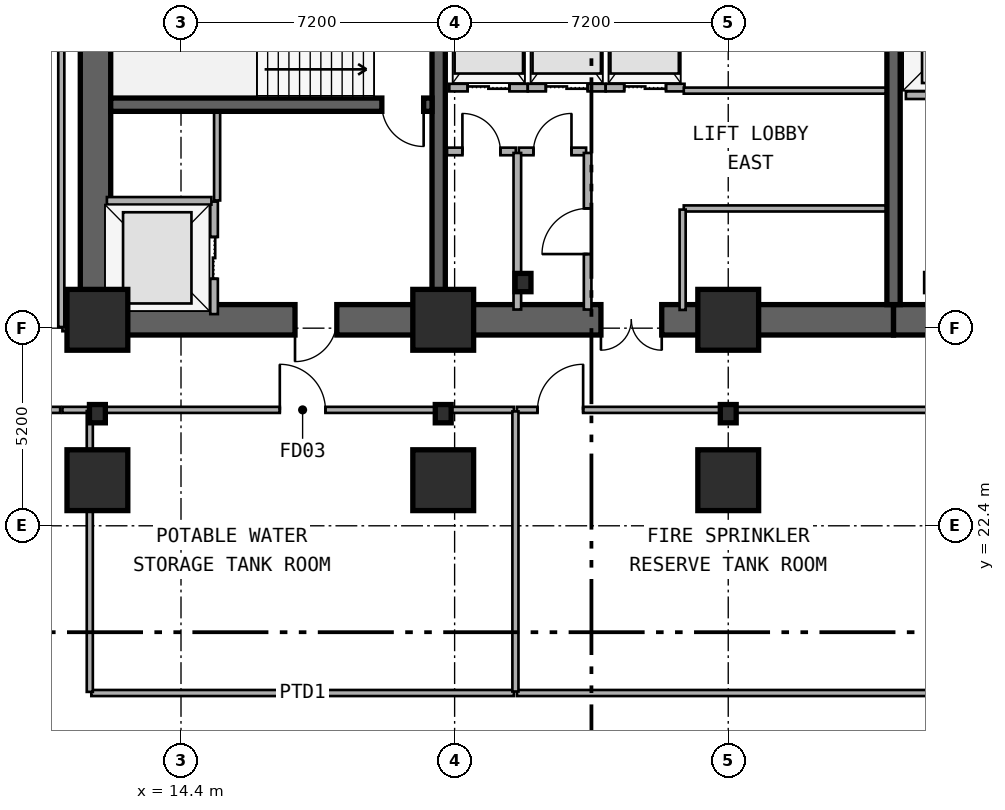
"""IFC4 building model, lengths in metres.
Left out: names, types, materials, properties, quantities, classifications, styles, units other than length and angle.
Written with IfcOpenShell. Run it as: python <this file> out.ifc"""

import sys

from ifc_helpers import new_model, si_unit, direction, frame, frame_2d, origin, origin_2d, place, context, subcontext, project, spatial, rectangle, i_section, extrude, element, fill, save


model = new_model("IFC4")
c1 = context("Model", 3, precision=1e-05, world=origin(), true_north=direction((0.0, 1.0)))
c2 = subcontext(c1, "Body", "Model", "MODEL_VIEW")
j1 = project(units=[si_unit("LENGTHUNIT", "METRE"), si_unit("PLANEANGLEUNIT", "RADIAN")], contexts=[c1])
p1 = place(None, origin())
s1 = spatial("IfcSite", under=j1, at=p1, CompositionType="ELEMENT")
p2 = place(p1, origin())
s2 = spatial("IfcBuilding", under=s1, at=p2, CompositionType="ELEMENT")
p3 = place(p2, frame((0.0, 0.0, -13.2)))
s3 = spatial("IfcBuildingStorey", under=s2, at=p3, CompositionType="ELEMENT", Elevation=-13.2)
p4 = place(p3, frame((21.18, 27.82, 0.0), z_axis=(0.0, 0.0, 1.0), x_axis=(-1.0, 0.0, 0.0)))
e1 = element("IfcWall", 1, at=p4, inside=s3, PredefinedType="SHEAR", context=c2, shape_type="SweptSolid", body=[
    extrude(rectangle(XDim=9.03, YDim=0.8, at=frame_2d((4.515, 0.0))), origin(), (0.0, 0.0, 1.0), 4.4),
])
p5 = place(p4, frame((2.68, 0.0, 0.0)))
e2 = element("IfcOpeningElement", 2, at=p5, cuts=e1, PredefinedType="OPENING", context=c2, shape_type="SweptSolid", body=[
    extrude(rectangle(XDim=1.1, YDim=2.15, at=frame_2d((0.55, 1.075))), frame((0.0, 0.41, 0.0), z_axis=(0.0, -1.0, 0.0), x_axis=(1.0, 0.0, 0.0)), (0.0, 0.0, 1.0), 0.82),
])
p6 = place(p3, frame((33.15, 27.82, 0.0), z_axis=(0.0, 0.0, 1.0), x_axis=(-1.0, 0.0, 0.0)))
e3 = element("IfcWall", 3, at=p6, inside=s3, PredefinedType="SHEAR", context=c2, shape_type="SweptSolid", body=[
    extrude(rectangle(XDim=11.97, YDim=0.8, at=frame_2d((5.985, 0.0))), origin(), (0.0, 0.0, 1.0), 4.4),
])
p7 = place(p6, frame((6.1, 0.0, 0.0)))
e4 = element("IfcOpeningElement", 4, at=p7, cuts=e3, PredefinedType="OPENING", context=c2, shape_type="SweptSolid", body=[
    extrude(rectangle(XDim=1.6, YDim=2.2, at=frame_2d((0.8, 1.1))), frame((0.0, 0.41, 0.0), z_axis=(0.0, -1.0, 0.0), x_axis=(1.0, 0.0, 0.0)), (0.0, 0.0, 1.0), 0.82),
])
p8 = place(p3, frame((45.38, 27.82, 0.0), z_axis=(0.0, 0.0, 1.0), x_axis=(-1.0, 0.0, 0.0)))
e5 = element("IfcWall", 5, at=p8, inside=s3, PredefinedType="SHEAR", context=c2, shape_type="SweptSolid", body=[
    extrude(rectangle(XDim=12.23, YDim=0.8, at=frame_2d((6.115, 0.0))), origin(), (0.0, 0.0, 1.0), 4.4),
])
p9 = place(p8, frame((9.93, 0.0, 0.0)))
e6 = element("IfcOpeningElement", 6, at=p9, cuts=e5, PredefinedType="OPENING", context=c2, shape_type="SweptSolid", body=[
    extrude(rectangle(XDim=1.1, YDim=2.15, at=frame_2d((0.55, 1.075))), frame((0.0, 0.41, 0.0), z_axis=(0.0, -1.0, 0.0), x_axis=(1.0, 0.0, 0.0)), (0.0, 0.0, 1.0), 0.82),
])
p10 = place(p8, frame((6.23, 0.0, 0.0)))
e7 = element("IfcOpeningElement", 7, at=p10, cuts=e5, PredefinedType="OPENING", context=c2, shape_type="SweptSolid", body=[
    extrude(rectangle(XDim=1.1, YDim=2.15, at=frame_2d((0.55, 1.075))), frame((0.0, 0.41, 0.0), z_axis=(0.0, -1.0, 0.0), x_axis=(1.0, 0.0, 0.0)), (0.0, 0.0, 1.0), 0.82),
])
p11 = place(p3, frame((12.15, 28.22, 0.0), z_axis=(0.0, 0.0, 1.0), x_axis=(0.0, 1.0, 0.0)))
e8 = element("IfcWall", 8, at=p11, inside=s3, PredefinedType="SHEAR", context=c2, shape_type="SweptSolid", body=[
    extrude(rectangle(XDim=8.43, YDim=0.8, at=frame_2d((4.215, 0.0))), origin(), (0.0, 0.0, 1.0), 4.4),
])
for number, where, z_axis, x_axis in (
    (9, (21.18, 28.22, 0.0), (0.0, 0.0, 1.0), (0.0, 1.0, 0.0)),
    (10, (33.15, 28.22, 0.0), (0.0, 0.0, 1.0), (0.0, 1.0, 0.0)),
):
    element("IfcWall", number, at=place(p3, frame(where, z_axis=z_axis, x_axis=x_axis)), inside=s3, PredefinedType="SHEAR", context=c2, shape_type="SweptSolid", body=[
        extrude(rectangle(XDim=8.43, YDim=0.35, at=frame_2d((4.215, 0.0))), origin(), (0.0, 0.0, 1.0), 4.4),
    ])
p12 = place(p3, frame((21.005, 33.48, 0.0), z_axis=(0.0, 0.0, 1.0), x_axis=(-1.0, 0.0, 0.0)))
e11 = element("IfcWall", 11, at=p12, inside=s3, PredefinedType="SHEAR", context=c2, shape_type="SweptSolid", body=[
    extrude(rectangle(XDim=8.455, YDim=0.35, at=frame_2d((4.228, 0.0))), origin(), (0.0, 0.0, 1.0), 4.4),
])
p13 = place(p12, frame((0.22, 0.0, 0.0)))
e12 = element("IfcOpeningElement", 12, at=p13, cuts=e11, PredefinedType="OPENING", context=c2, shape_type="SweptSolid", body=[
    extrude(rectangle(XDim=1.1, YDim=2.15, at=frame_2d((0.55, 1.075))), frame((0.0, 0.185, 0.0), z_axis=(0.0, -1.0, 0.0), x_axis=(1.0, 0.0, 0.0)), (0.0, 0.0, 1.0), 0.37),
])
p14 = place(p3, frame((23.4, 28.8, 0.0), z_axis=(0.0, 0.0, 1.0), x_axis=(1.0, 0.0, 0.0)))
e13 = element("IfcColumn", 13, at=p14, inside=s3, PredefinedType="COLUMN", context=c2, shape_type="SweptSolid", body=[
    extrude(i_section(OverallWidth=0.418, OverallDepth=0.481, WebThickness=0.043, FlangeThickness=0.068, FilletRadius=0.015, at=origin_2d()), origin(), (0.0, 0.0, 1.0), 4.4),
])
for number, where, z_axis, x_axis in (
    (14, (12.2, 27.82, 0.0), (0.0, 0.0, 1.0), (1.0, 0.0, 0.0)),
    (15, (21.3, 27.82, 0.0), (0.0, 0.0, 1.0), (1.0, 0.0, 0.0)),
    (16, (28.8, 27.82, 0.0), (0.0, 0.0, 1.0), (1.0, 0.0, 0.0)),
):
    element("IfcColumn", number, at=place(p3, frame(where, z_axis=z_axis, x_axis=x_axis)), inside=s3, PredefinedType="COLUMN", context=c2, shape_type="SweptSolid", body=[
        extrude(rectangle(XDim=1.6, YDim=1.6, at=origin_2d()), origin(), (0.0, 0.0, 1.0), 4.4),
    ])
for number, where, z_axis, x_axis in (
    (17, (12.2, 25.35, 0.0), (0.0, 0.0, 1.0), (1.0, 0.0, 0.0)),
    (18, (21.3, 25.35, 0.0), (0.0, 0.0, 1.0), (1.0, 0.0, 0.0)),
    (19, (28.8, 25.35, 0.0), (0.0, 0.0, 1.0), (1.0, 0.0, 0.0)),
):
    element("IfcColumn", number, at=place(p3, frame(where, z_axis=z_axis, x_axis=x_axis)), inside=s3, PredefinedType="COLUMN", context=c2, shape_type="SweptSolid", body=[
        extrude(i_section(OverallWidth=0.418, OverallDepth=0.481, WebThickness=0.043, FlangeThickness=0.068, FilletRadius=0.015, at=origin_2d()), origin(), (0.0, 0.0, 1.0), 4.4),
    ])
for number, where, z_axis, x_axis in (
    (20, (12.2, 23.6, 0.0), (0.0, 0.0, 1.0), (1.0, 0.0, 0.0)),
    (21, (21.3, 23.6, 0.0), (0.0, 0.0, 1.0), (1.0, 0.0, 0.0)),
    (22, (28.8, 23.6, 0.0), (0.0, 0.0, 1.0), (1.0, 0.0, 0.0)),
):
    element("IfcColumn", number, at=place(p3, frame(where, z_axis=z_axis, x_axis=x_axis)), inside=s3, PredefinedType="COLUMN", context=c2, shape_type="SweptSolid", body=[
        extrude(rectangle(XDim=1.6, YDim=1.6, at=origin_2d()), origin(), (0.0, 0.0, 1.0), 4.4),
    ])
p15 = place(p3, frame((15.27, 27.97, 0.0), z_axis=(0.0, 0.0, 1.0), x_axis=(0.0, 1.0, 0.0)))
e23 = element("IfcWall", 23, at=p15, inside=s3, PredefinedType="PARTITIONING", context=c2, shape_type="SweptSolid", body=[
    extrude(rectangle(XDim=2.96, YDim=0.2, at=frame_2d((1.48, 0.0))), origin(), (0.0, 0.0, 1.0), 3.052),
])
p16 = place(p15, frame((0.93, 0.0, 0.0)))
e24 = element("IfcOpeningElement", 24, at=p16, cuts=e23, PredefinedType="OPENING", context=c2, shape_type="SweptSolid", body=[
    extrude(rectangle(XDim=1.1, YDim=2.15, at=frame_2d((0.55, 1.075))), frame((0.0, 0.11, 0.0), z_axis=(0.0, -1.0, 0.0), x_axis=(1.0, 0.0, 0.0)), (0.0, 0.0, 1.0), 0.22),
])
p17 = place(p3, frame((12.45, 30.95, 0.0), z_axis=(0.0, 0.0, 1.0), x_axis=(1.0, 0.0, 0.0)))
e25 = element("IfcWall", 25, at=p17, inside=s3, PredefinedType="PARTITIONING", context=c2, shape_type="SweptSolid", body=[
    extrude(rectangle(XDim=2.75, YDim=0.2, at=frame_2d((1.375, 0.0))), origin(), (0.0, 0.0, 1.0), 3.052),
])
p18 = place(p3, frame((33.475, 33.73, 0.0), z_axis=(0.0, 0.0, 1.0), x_axis=(1.0, 0.0, 0.0)))
e26 = element("IfcWall", 26, at=p18, inside=s3, PredefinedType="PARTITIONING", context=c2, shape_type="SweptSolid", body=[
    extrude(rectangle(XDim=2.725, YDim=0.2, at=frame_2d((1.362, 0.0))), origin(), (0.0, 0.0, 1.0), 3.052),
])
p19 = place(p18, frame((0.812, 0.0, 0.0)))
e27 = element("IfcOpeningElement", 27, at=p19, cuts=e26, PredefinedType="OPENING", context=c2, shape_type="SweptSolid", body=[
    extrude(rectangle(XDim=1.1, YDim=2.15, at=frame_2d((0.55, 1.075))), frame((0.0, 0.11, 0.0), z_axis=(0.0, -1.0, 0.0), x_axis=(1.0, 0.0, 0.0)), (0.0, 0.0, 1.0), 0.22),
])
p20 = place(p3, frame((21.46, 33.93, 0.0), z_axis=(0.0, 0.0, 1.0), x_axis=(1.0, 0.0, 0.0)))
e28 = element("IfcWall", 28, at=p20, inside=s3, PredefinedType="PARTITIONING", context=c2, shape_type="SweptSolid", body=[
    extrude(rectangle(XDim=2.065, YDim=0.2, at=frame_2d((1.032, 0.0))), origin(), (0.0, 0.0, 1.0), 3.052),
])
p21 = place(p20, frame((0.482, 0.0, 0.0)))
e29 = element("IfcOpeningElement", 29, at=p21, cuts=e28, PredefinedType="OPENING", context=c2, shape_type="SweptSolid", body=[
    extrude(rectangle(XDim=1.1, YDim=2.15, at=frame_2d((0.55, 1.075))), frame((0.0, 0.11, 0.0), z_axis=(0.0, -1.0, 0.0), x_axis=(1.0, 0.0, 0.0)), (0.0, 0.0, 1.0), 0.22),
])
p22 = place(p3, frame((23.525, 33.93, 0.0), z_axis=(0.0, 0.0, 1.0), x_axis=(1.0, 0.0, 0.0)))
e30 = element("IfcWall", 30, at=p22, inside=s3, PredefinedType="PARTITIONING", context=c2, shape_type="SweptSolid", body=[
    extrude(rectangle(XDim=2.05, YDim=0.2, at=frame_2d((1.025, 0.0))), origin(), (0.0, 0.0, 1.0), 4.08),
])
p23 = place(p22, frame((0.475, 0.0, 0.0)))
e31 = element("IfcOpeningElement", 31, at=p23, cuts=e30, PredefinedType="OPENING", context=c2, shape_type="SweptSolid", body=[
    extrude(rectangle(XDim=1.1, YDim=2.15, at=frame_2d((0.55, 1.075))), frame((0.0, 0.11, 0.0), z_axis=(0.0, -1.0, 0.0), x_axis=(1.0, 0.0, 0.0)), (0.0, 0.0, 1.0), 0.22),
])
p24 = place(p3, frame((25.575, 33.93, 0.0), z_axis=(0.0, 0.0, 1.0), x_axis=(1.0, 0.0, 0.0)))
e32 = element("IfcWall", 32, at=p24, inside=s3, PredefinedType="PARTITIONING", context=c2, shape_type="SweptSolid", body=[
    extrude(rectangle(XDim=2.075, YDim=0.2, at=frame_2d((1.038, 0.0))), origin(), (0.0, 0.0, 1.0), 4.08),
])
p25 = place(p24, frame((0.488, 0.0, 0.0)))
e33 = element("IfcOpeningElement", 33, at=p25, cuts=e32, PredefinedType="OPENING", context=c2, shape_type="SweptSolid", body=[
    extrude(rectangle(XDim=1.1, YDim=2.15, at=frame_2d((0.55, 1.075))), frame((0.0, 0.11, 0.0), z_axis=(0.0, -1.0, 0.0), x_axis=(1.0, 0.0, 0.0)), (0.0, 0.0, 1.0), 0.22),
])
p26 = place(p3, frame((21.4, 32.25, 0.0), z_axis=(0.0, 0.0, 1.0), x_axis=(1.0, 0.0, 0.0)))
e34 = element("IfcWall", 34, at=p26, inside=s3, PredefinedType="PARTITIONING", context=c2, shape_type="SweptSolid", body=[
    extrude(rectangle(XDim=1.81, YDim=0.2, at=frame_2d((0.905, 0.0))), origin(), (0.0, 0.0, 1.0), 3.052),
])
p27 = place(p26, frame((0.405, 0.0, 0.0)))
e35 = element("IfcOpeningElement", 35, at=p27, cuts=e34, PredefinedType="OPENING", context=c2, shape_type="SweptSolid", body=[
    extrude(rectangle(XDim=1.0, YDim=2.15, at=frame_2d((0.5, 1.075))), frame((0.0, 0.11, 0.0), z_axis=(0.0, -1.0, 0.0), x_axis=(1.0, 0.0, 0.0)), (0.0, 0.0, 1.0), 0.22),
])
p28 = place(p3, frame((23.29, 32.25, 0.0), z_axis=(0.0, 0.0, 1.0), x_axis=(1.0, 0.0, 0.0)))
e36 = element("IfcWall", 36, at=p28, inside=s3, PredefinedType="PARTITIONING", context=c2, shape_type="SweptSolid", body=[
    extrude(rectangle(XDim=1.77, YDim=0.2, at=frame_2d((0.885, 0.0))), origin(), (0.0, 0.0, 1.0), 4.08),
])
p29 = place(p28, frame((0.385, 0.0, 0.0)))
e37 = element("IfcOpeningElement", 37, at=p29, cuts=e36, PredefinedType="OPENING", context=c2, shape_type="SweptSolid", body=[
    extrude(rectangle(XDim=1.0, YDim=2.15, at=frame_2d((0.5, 1.075))), frame((0.0, 0.11, 0.0), z_axis=(0.0, -1.0, 0.0), x_axis=(1.0, 0.0, 0.0)), (0.0, 0.0, 1.0), 0.22),
])
p30 = place(p3, frame((25.1, 28.09, 0.0), z_axis=(0.0, 0.0, 1.0), x_axis=(0.0, 1.0, 0.0)))
e38 = element("IfcWall", 38, at=p30, inside=s3, PredefinedType="PARTITIONING", context=c2, shape_type="SweptSolid", body=[
    extrude(rectangle(XDim=4.12, YDim=0.2, at=frame_2d((2.06, 0.0))), origin(), (0.0, 0.0, 1.0), 4.08),
])
p31 = place(p30, frame((1.46, 0.0, 0.0)))
e39 = element("IfcOpeningElement", 39, at=p31, cuts=e38, PredefinedType="OPENING", context=c2, shape_type="SweptSolid", body=[
    extrude(rectangle(XDim=1.2, YDim=2.15, at=frame_2d((0.6, 1.075))), frame((0.0, 0.11, 0.0), z_axis=(0.0, -1.0, 0.0), x_axis=(1.0, 0.0, 0.0)), (0.0, 0.0, 1.0), 0.22),
])
p32 = place(p3, frame((23.25, 28.09, 0.0), z_axis=(0.0, 0.0, 1.0), x_axis=(0.0, 1.0, 0.0)))
e40 = element("IfcWall", 40, at=p32, inside=s3, PredefinedType="PARTITIONING", context=c2, shape_type="SweptSolid", body=[
    extrude(rectangle(XDim=4.12, YDim=0.2, at=frame_2d((2.06, 0.0))), origin(), (0.0, 0.0, 1.0), 4.08),
])
p33 = place(p3, frame((12.04, 25.45, 0.0), z_axis=(0.0, 0.0, 1.0), x_axis=(1.0, 0.0, 0.0)))
e41 = element("IfcWall", 41, at=p33, inside=s3, PredefinedType="PARTITIONING", context=c2, shape_type="SweptSolid", body=[
    extrude(rectangle(XDim=11.12, YDim=0.16, at=frame_2d((5.56, 0.0))), origin(), (0.0, 0.0, 1.0), 3.246),
])
p34 = place(p33, frame((4.96, 0.0, 0.0)))
e42 = element("IfcOpeningElement", 42, at=p34, cuts=e41, PredefinedType="OPENING", context=c2, shape_type="SweptSolid", body=[
    extrude(rectangle(XDim=1.2, YDim=2.15, at=frame_2d((0.6, 1.075))), frame((0.0, 0.09, 0.0), z_axis=(0.0, -1.0, 0.0), x_axis=(1.0, 0.0, 0.0)), (0.0, 0.0, 1.0), 0.18),
])
p35 = place(p3, frame((23.24, 25.45, 0.0), z_axis=(0.0, 0.0, 1.0), x_axis=(1.0, 0.0, 0.0)))
e43 = element("IfcWall", 43, at=p35, inside=s3, PredefinedType="PARTITIONING", context=c2, shape_type="SweptSolid", body=[
    extrude(rectangle(XDim=11.12, YDim=0.16, at=frame_2d((5.56, 0.0))), origin(), (0.0, 0.0, 1.0), 4.08),
])
p36 = place(p35, frame((0.542, 0.0, 0.0)))
e44 = element("IfcOpeningElement", 44, at=p36, cuts=e43, PredefinedType="OPENING", context=c2, shape_type="SweptSolid", body=[
    extrude(rectangle(XDim=1.2, YDim=2.15, at=frame_2d((0.6, 1.075))), frame((0.0, 0.09, 0.0), z_axis=(0.0, -1.0, 0.0), x_axis=(1.0, 0.0, 0.0)), (0.0, 0.0, 1.0), 0.18),
])
p37 = place(p3, frame((12.04, 18.0, 0.0), z_axis=(0.0, 0.0, 1.0), x_axis=(1.0, 0.0, 0.0)))
e45 = element("IfcWall", 45, at=p37, inside=s3, PredefinedType="PARTITIONING", context=c2, shape_type="SweptSolid", body=[
    extrude(rectangle(XDim=11.12, YDim=0.16, at=frame_2d((5.56, 0.0))), origin(), (0.0, 0.0, 1.0), 3.246),
])
p38 = place(p3, frame((23.24, 18.0, 0.0), z_axis=(0.0, 0.0, 1.0), x_axis=(1.0, 0.0, 0.0)))
e46 = element("IfcWall", 46, at=p38, inside=s3, PredefinedType="PARTITIONING", context=c2, shape_type="SweptSolid", body=[
    extrude(rectangle(XDim=11.12, YDim=0.16, at=frame_2d((5.56, 0.0))), origin(), (0.0, 0.0, 1.0), 4.08),
])
p39 = place(p3, frame((23.2, 18.04, 0.0), z_axis=(0.0, 0.0, 1.0), x_axis=(0.0, 1.0, 0.0)))
e47 = element("IfcWall", 47, at=p39, inside=s3, PredefinedType="PARTITIONING", context=c2, shape_type="SweptSolid", body=[
    extrude(rectangle(XDim=7.37, YDim=0.16, at=frame_2d((3.685, 0.0))), origin(), (0.0, 0.0, 1.0), 2.66),
])
p40 = place(p3, frame((15.35, 30.96, 0.0), z_axis=(0.0, 0.0, 1.0), x_axis=(0.0, 1.0, 0.0)))
e48 = element("IfcWall", 48, at=p40, inside=s3, PredefinedType="PARTITIONING", context=c2, shape_type="SweptSolid", body=[
    extrude(rectangle(XDim=2.31, YDim=0.16, at=frame_2d((1.155, 0.0))), origin(), (0.0, 0.0, 1.0), 4.08),
])
for number, where, z_axis, x_axis in (
    (49, (27.63, 30.75, 0.0), (0.0, 0.0, 1.0), (1.0, 0.0, 0.0)),
    (50, (27.63, 33.85, 0.0), (0.0, 0.0, 1.0), (1.0, 0.0, 0.0)),
):
    element("IfcWall", number, at=place(p3, frame(where, z_axis=z_axis, x_axis=x_axis)), inside=s3, PredefinedType="PARTITIONING", context=c2, shape_type="SweptSolid", body=[
        extrude(rectangle(XDim=5.31, YDim=0.16, at=frame_2d((2.655, 0.0))), origin(), (0.0, 0.0, 1.0), 3.052),
    ])
p41 = place(p3, frame((27.6, 28.08, 0.0), z_axis=(0.0, 0.0, 1.0), x_axis=(0.0, 1.0, 0.0)))
e51 = element("IfcWall", 51, at=p41, inside=s3, PredefinedType="PARTITIONING", context=c2, shape_type="SweptSolid", body=[
    extrude(rectangle(XDim=2.64, YDim=0.16, at=frame_2d((1.32, 0.0))), origin(), (0.0, 0.0, 1.0), 4.08),
])
p42 = place(p3, frame((11.28, 25.45, 0.0), z_axis=(0.0, 0.0, 1.0), x_axis=(1.0, 0.0, 0.0)))
e52 = element("IfcWall", 52, at=p42, inside=s3, PredefinedType="PARTITIONING", context=c2, shape_type="SweptSolid", body=[
    extrude(rectangle(XDim=0.69, YDim=0.16, at=frame_2d((0.345, 0.0))), origin(), (0.0, 0.0, 1.0), 3.246),
])
p43 = place(p3, frame((11.28, 27.6, 0.0), z_axis=(0.0, 0.0, 1.0), x_axis=(1.0, 0.0, 0.0)))
e53 = element("IfcWall", 53, at=p43, inside=s3, PredefinedType="PARTITIONING", context=c2, shape_type="SweptSolid", body=[
    extrude(rectangle(XDim=0.84, YDim=0.16, at=frame_2d((0.42, 0.0))), origin(), (0.0, 0.0, 1.0), 3.052),
])
p44 = place(p3, frame((1.83, 25.45, 0.0), z_axis=(0.0, 0.0, 1.0), x_axis=(1.0, 0.0, 0.0)))
e54 = element("IfcWall", 54, at=p44, inside=s3, PredefinedType="PARTITIONING", context=c2, shape_type="SweptSolid", body=[
    extrude(rectangle(XDim=9.39, YDim=0.16, at=frame_2d((4.695, 0.0))), origin(), (0.0, 0.0, 1.0), 4.08),
])
p45 = place(p3, frame((11.25, 27.63, 0.0), z_axis=(0.0, 0.0, 1.0), x_axis=(0.0, 1.0, 0.0)))
e55 = element("IfcWall", 55, at=p45, inside=s3, PredefinedType="PARTITIONING", context=c2, shape_type="SweptSolid", body=[
    extrude(rectangle(XDim=10.29, YDim=0.16, at=frame_2d((5.145, 0.0))), origin(), (0.0, 0.0, 1.0), 4.08),
])
p46 = place(p3, frame((12.0, 18.03, 0.0), z_axis=(0.0, 0.0, 1.0), x_axis=(0.0, 1.0, 0.0)))
e56 = element("IfcWall", 56, at=p46, inside=s3, PredefinedType="PARTITIONING", context=c2, shape_type="SweptSolid", body=[
    extrude(rectangle(XDim=7.39, YDim=0.16, at=frame_2d((3.695, 0.0))), origin(), (0.0, 0.0, 1.0), 2.66),
])
p47 = place(p16, origin())
e57 = element("IfcDoor", 57, at=p47, inside=s3, OperationType="DOUBLE_DOOR_SLIDING", PredefinedType="DOOR", context=c2, shape_type="SweptSolid", body=[
    extrude(rectangle(XDim=1.1, YDim=2.15, at=frame_2d((0.55, 1.075))), frame((0.0, 0.025, 0.0), z_axis=(0.0, -1.0, 0.0), x_axis=(1.0, 0.0, 0.0)), (0.0, 0.0, 1.0), 0.05),
])
fill(e24, e57)
p48 = place(p21, origin())
e58 = element("IfcDoor", 58, at=p48, inside=s3, OperationType="DOUBLE_DOOR_SLIDING", PredefinedType="DOOR", context=c2, shape_type="SweptSolid", body=[
    extrude(rectangle(XDim=1.1, YDim=2.15, at=frame_2d((0.55, 1.075))), frame((0.0, 0.025, 0.0), z_axis=(0.0, -1.0, 0.0), x_axis=(1.0, 0.0, 0.0)), (0.0, 0.0, 1.0), 0.05),
])
fill(e29, e58)
p49 = place(p23, origin())
e59 = element("IfcDoor", 59, at=p49, inside=s3, OperationType="DOUBLE_DOOR_SLIDING", PredefinedType="DOOR", context=c2, shape_type="SweptSolid", body=[
    extrude(rectangle(XDim=1.1, YDim=2.15, at=frame_2d((0.55, 1.075))), frame((0.0, 0.025, 0.0), z_axis=(0.0, -1.0, 0.0), x_axis=(1.0, 0.0, 0.0)), (0.0, 0.0, 1.0), 0.05),
])
fill(e31, e59)
p50 = place(p25, origin())
e60 = element("IfcDoor", 60, at=p50, inside=s3, OperationType="DOUBLE_DOOR_SLIDING", PredefinedType="DOOR", context=c2, shape_type="SweptSolid", body=[
    extrude(rectangle(XDim=1.1, YDim=2.15, at=frame_2d((0.55, 1.075))), frame((0.0, 0.025, 0.0), z_axis=(0.0, -1.0, 0.0), x_axis=(1.0, 0.0, 0.0)), (0.0, 0.0, 1.0), 0.05),
])
fill(e33, e60)
p51 = place(p13, origin())
e61 = element("IfcDoor", 61, at=p51, inside=s3, OperationType="SINGLE_SWING_LEFT", PredefinedType="DOOR", context=c2, shape_type="SweptSolid", body=[
    extrude(rectangle(XDim=1.1, YDim=2.15, at=frame_2d((0.55, 1.075))), frame((0.0, 0.025, 0.0), z_axis=(0.0, -1.0, 0.0), x_axis=(1.0, 0.0, 0.0)), (0.0, 0.0, 1.0), 0.05),
])
fill(e12, e61)
p52 = place(p5, origin())
e62 = element("IfcDoor", 62, at=p52, inside=s3, OperationType="SINGLE_SWING_RIGHT", PredefinedType="DOOR", context=c2, shape_type="SweptSolid", body=[
    extrude(rectangle(XDim=1.1, YDim=2.15, at=frame_2d((0.55, 1.075))), frame((0.0, 0.025, 0.0), z_axis=(0.0, -1.0, 0.0), x_axis=(1.0, 0.0, 0.0)), (0.0, 0.0, 1.0), 0.05),
])
fill(e2, e62)
p53 = place(p7, origin())
e63 = element("IfcDoor", 63, at=p53, inside=s3, OperationType="SINGLE_SWING_LEFT", PredefinedType="DOOR", context=c2, shape_type="SweptSolid", body=[
    extrude(rectangle(XDim=1.6, YDim=2.2, at=frame_2d((0.8, 1.1))), frame((0.0, 0.025, 0.0), z_axis=(0.0, -1.0, 0.0), x_axis=(1.0, 0.0, 0.0)), (0.0, 0.0, 1.0), 0.05),
])
fill(e4, e63)
p54 = place(p27, origin())
e64 = element("IfcDoor", 64, at=p54, inside=s3, OperationType="SINGLE_SWING_LEFT", PredefinedType="DOOR", context=c2, shape_type="SweptSolid", body=[
    extrude(rectangle(XDim=1.0, YDim=2.15, at=frame_2d((0.5, 1.075))), frame((0.0, 0.025, 0.0), z_axis=(0.0, -1.0, 0.0), x_axis=(1.0, 0.0, 0.0)), (0.0, 0.0, 1.0), 0.05),
])
fill(e35, e64)
p55 = place(p29, origin())
e65 = element("IfcDoor", 65, at=p55, inside=s3, OperationType="SINGLE_SWING_RIGHT", PredefinedType="DOOR", context=c2, shape_type="SweptSolid", body=[
    extrude(rectangle(XDim=1.0, YDim=2.15, at=frame_2d((0.5, 1.075))), frame((0.0, 0.025, 0.0), z_axis=(0.0, -1.0, 0.0), x_axis=(1.0, 0.0, 0.0)), (0.0, 0.0, 1.0), 0.05),
])
fill(e37, e65)
p56 = place(p31, origin())
e66 = element("IfcDoor", 66, at=p56, inside=s3, OperationType="SINGLE_SWING_LEFT", PredefinedType="DOOR", context=c2, shape_type="SweptSolid", body=[
    extrude(rectangle(XDim=1.2, YDim=2.15, at=frame_2d((0.6, 1.075))), frame((0.0, 0.025, 0.0), z_axis=(0.0, -1.0, 0.0), x_axis=(1.0, 0.0, 0.0)), (0.0, 0.0, 1.0), 0.05),
])
fill(e39, e66)
p57 = place(p34, origin())
e67 = element("IfcDoor", 67, at=p57, inside=s3, OperationType="SINGLE_SWING_LEFT", PredefinedType="DOOR", context=c2, shape_type="SweptSolid", body=[
    extrude(rectangle(XDim=1.2, YDim=2.15, at=frame_2d((0.6, 1.075))), frame((0.0, 0.025, 0.0), z_axis=(0.0, -1.0, 0.0), x_axis=(1.0, 0.0, 0.0)), (0.0, 0.0, 1.0), 0.05),
])
fill(e42, e67)
p58 = place(p36, origin())
e68 = element("IfcDoor", 68, at=p58, inside=s3, OperationType="SINGLE_SWING_RIGHT", PredefinedType="DOOR", context=c2, shape_type="SweptSolid", body=[
    extrude(rectangle(XDim=1.2, YDim=2.15, at=frame_2d((0.6, 1.075))), frame((0.0, 0.025, 0.0), z_axis=(0.0, -1.0, 0.0), x_axis=(1.0, 0.0, 0.0)), (0.0, 0.0, 1.0), 0.05),
])
fill(e44, e68)
save(model, sys.argv[1])
